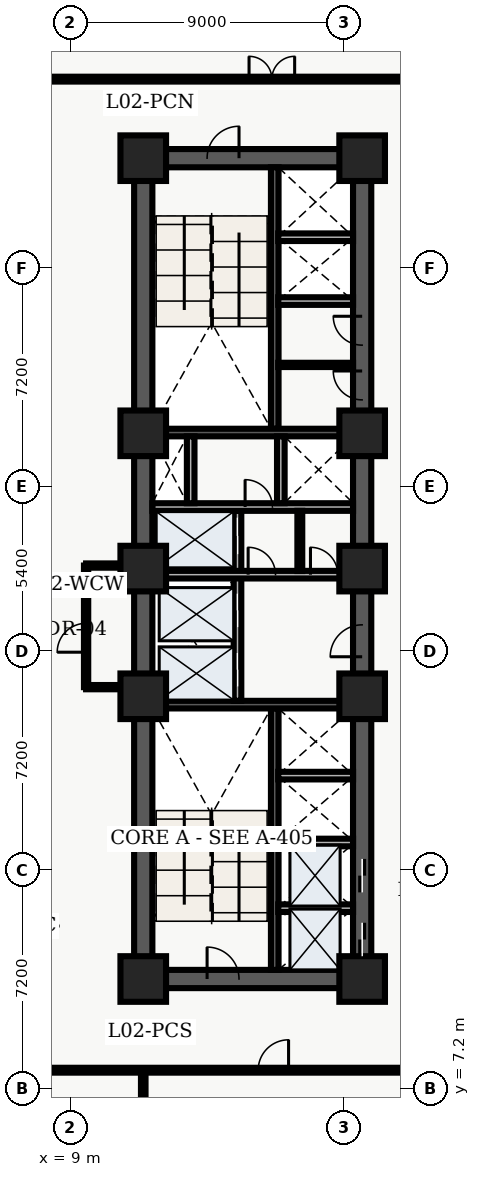
"""IFC4 building model, lengths in metres.
Left out: names, types, materials, properties, quantities, classifications, styles, units other than length and angle.
Written with IfcOpenShell. Run it as: python <this file> out.ifc"""

import sys

from ifc_helpers import new_model, entity, si_unit, converted_unit, direction, frame, origin_with_axes, origin_2d_with_axis, place, context, subcontext, project, spatial, polyline, rectangle, outline, extrude, element, fill, save


model = new_model("IFC4")
c1 = context("Model", 3, precision=1e-05, world=origin_with_axes(), true_north=direction((0.0, 1.0)))
c2 = subcontext(c1, "Body", "Model", "MODEL_VIEW")
j1 = project(units=[si_unit("LENGTHUNIT", "METRE"), converted_unit("PLANEANGLEUNIT", "DEGREE", entity("IfcPlaneAngleMeasure", 0.017), si_unit("PLANEANGLEUNIT", "RADIAN"), dimensions=[0, 0, 0, 0, 0, 0, 0])], contexts=[c1])
p1 = place(None, origin_with_axes())
s1 = spatial("IfcSite", under=j1, at=p1, CompositionType="ELEMENT")
p2 = place(p1, origin_with_axes())
s2 = spatial("IfcBuilding", under=s1, at=p2, CompositionType="ELEMENT")
p3 = place(p2, frame((0.0, 0.0, 10.8), z_axis=(0.0, 0.0, 1.0), x_axis=(1.0, 0.0, 0.0)))
s3 = spatial("IfcBuildingStorey", under=s2, at=p3, CompositionType="ELEMENT", Elevation=10.8)
p4 = place(p3, frame((11.4, 10.8, 0.0), z_axis=(0.0, 0.0, 1.0), x_axis=(0.0, 1.0, 0.0)))
e1 = element("IfcWall", 1, at=p4, inside=s3, PredefinedType="SHEAR", context=c2, shape_type="SweptSolid", body=[
    extrude(outline(polyline([(0.0, -0.3), (27.0, -0.3), (27.0, 0.3), (0.0, 0.3), (0.0, -0.3)])), origin_with_axes(), (0.0, 0.0, 1.0), 4.26),
])
p5 = place(p3, frame((11.4, 10.8, 0.0), z_axis=(0.0, 0.0, 1.0), x_axis=(1.0, 0.0, 0.0)))
e2 = element("IfcWall", 2, at=p5, inside=s3, PredefinedType="SHEAR", context=c2, shape_type="SweptSolid", body=[
    extrude(outline(polyline([(0.0, -0.3), (7.2, -0.3), (7.2, 0.3), (0.0, 0.3), (0.0, -0.3)])), origin_with_axes(), (0.0, 0.0, 1.0), 4.26),
])
p6 = place(p5, frame((2.625, 0.0, 0.0), z_axis=(0.0, 0.0, 1.0), x_axis=(1.0, 0.0, 0.0)))
e3 = element("IfcOpeningElement", 3, at=p6, cuts=e2, PredefinedType="OPENING", context=c2, shape_type="SweptSolid", body=[
    extrude(rectangle(XDim=1.05, YDim=0.62, at=origin_2d_with_axis()), origin_with_axes(), (0.0, 0.0, 1.0), 2.15),
])
p7 = place(p3, frame((11.4, 37.8, 0.0), z_axis=(0.0, 0.0, 1.0), x_axis=(1.0, 0.0, 0.0)))
e4 = element("IfcWall", 4, at=p7, inside=s3, PredefinedType="SHEAR", context=c2, shape_type="SweptSolid", body=[
    extrude(outline(polyline([(0.0, -0.3), (7.2, -0.3), (7.2, 0.3), (0.0, 0.3), (0.0, -0.3)])), origin_with_axes(), (0.0, 0.0, 1.0), 4.26),
])
p8 = place(p7, frame((2.625, 0.0, 0.0), z_axis=(0.0, 0.0, 1.0), x_axis=(1.0, 0.0, 0.0)))
e5 = element("IfcOpeningElement", 5, at=p8, cuts=e4, PredefinedType="OPENING", context=c2, shape_type="SweptSolid", body=[
    extrude(rectangle(XDim=1.05, YDim=0.62, at=origin_2d_with_axis()), origin_with_axes(), (0.0, 0.0, 1.0), 2.15),
])
p9 = place(p3, frame((18.6, 10.8, 0.0), z_axis=(0.0, 0.0, 1.0), x_axis=(0.0, 1.0, 0.0)))
e6 = element("IfcWall", 6, at=p9, inside=s3, PredefinedType="SHEAR", context=c2, shape_type="SweptSolid", body=[
    extrude(outline(polyline([(0.0, -0.3), (13.5, -0.3), (13.5, 0.3), (0.0, 0.3), (0.0, -0.3)])), origin_with_axes(), (0.0, 0.0, 1.0), 4.26),
])
p10 = place(p9, frame((1.3, 0.0, 0.0), z_axis=(0.0, 0.0, 1.0), x_axis=(1.0, 0.0, 0.0)))
e7 = element("IfcOpeningElement", 7, at=p10, cuts=e6, PredefinedType="OPENING", context=c2, shape_type="SweptSolid", body=[
    extrude(rectangle(XDim=1.1, YDim=0.62, at=origin_2d_with_axis()), origin_with_axes(), (0.0, 0.0, 1.0), 2.15),
])
p11 = place(p9, frame((3.4, 0.0, 0.0), z_axis=(0.0, 0.0, 1.0), x_axis=(1.0, 0.0, 0.0)))
e8 = element("IfcOpeningElement", 8, at=p11, cuts=e6, PredefinedType="OPENING", context=c2, shape_type="SweptSolid", body=[
    extrude(rectangle(XDim=1.1, YDim=0.62, at=origin_2d_with_axis()), origin_with_axes(), (0.0, 0.0, 1.0), 2.15),
])
p12 = place(p9, frame((11.125, 0.0, 0.0), z_axis=(0.0, 0.0, 1.0), x_axis=(1.0, 0.0, 0.0)))
e9 = element("IfcOpeningElement", 9, at=p12, cuts=e6, PredefinedType="OPENING", context=c2, shape_type="SweptSolid", body=[
    extrude(rectangle(XDim=1.05, YDim=0.62, at=origin_2d_with_axis()), origin_with_axes(), (0.0, 0.0, 1.0), 2.15),
])
p13 = place(p3, frame((18.6, 24.3, 0.0), z_axis=(0.0, 0.0, 1.0), x_axis=(0.0, 1.0, 0.0)))
e10 = element("IfcWall", 10, at=p13, inside=s3, PredefinedType="SHEAR", context=c2, shape_type="SweptSolid", body=[
    extrude(outline(polyline([(0.0, -0.3), (13.5, -0.3), (13.5, 0.3), (0.0, 0.3), (0.0, -0.3)])), origin_with_axes(), (0.0, 0.0, 1.0), 4.26),
])
p14 = place(p13, frame((6.025, 0.0, 0.0), z_axis=(0.0, 0.0, 1.0), x_axis=(1.0, 0.0, 0.0)))
e11 = element("IfcOpeningElement", 11, at=p14, cuts=e10, PredefinedType="OPENING", context=c2, shape_type="SweptSolid", body=[
    extrude(rectangle(XDim=0.95, YDim=0.62, at=origin_2d_with_axis()), origin_with_axes(), (0.0, 0.0, 1.0), 2.15),
])
p15 = place(p13, frame((7.825, 0.0, 0.0), z_axis=(0.0, 0.0, 1.0), x_axis=(1.0, 0.0, 0.0)))
e12 = element("IfcOpeningElement", 12, at=p15, cuts=e10, PredefinedType="OPENING", context=c2, shape_type="SweptSolid", body=[
    extrude(rectangle(XDim=0.95, YDim=0.62, at=origin_2d_with_axis()), origin_with_axes(), (0.0, 0.0, 1.0), 2.15),
])
p16 = place(p3, frame((15.725, 11.1, 0.0), z_axis=(0.0, 0.0, 1.0), x_axis=(0.0, 1.0, 0.0)))
e13 = element("IfcWall", 13, at=p16, inside=s3, PredefinedType="SHEAR", context=c2, shape_type="SweptSolid", body=[
    extrude(outline(polyline([(0.0, -0.125), (8.6, -0.125), (8.6, 0.125), (0.0, 0.125), (0.0, -0.125)])), origin_with_axes(), (0.0, 0.0, 1.0), 4.26),
])
p17 = place(p3, frame((11.7, 19.825, 0.0), z_axis=(0.0, 0.0, 1.0), x_axis=(1.0, 0.0, 0.0)))
e14 = element("IfcWall", 14, at=p17, inside=s3, PredefinedType="SHEAR", context=c2, shape_type="SweptSolid", body=[
    extrude(outline(polyline([(0.0, -0.125), (6.6, -0.125), (6.6, 0.125), (0.0, 0.125), (0.0, -0.125)])), origin_with_axes(), (0.0, 0.0, 1.0), 4.26),
])
p18 = place(p3, frame((15.725, 28.9, 0.0), z_axis=(0.0, 0.0, 1.0), x_axis=(0.0, 1.0, 0.0)))
e15 = element("IfcWall", 15, at=p18, inside=s3, PredefinedType="SHEAR", context=c2, shape_type="SweptSolid", body=[
    extrude(outline(polyline([(0.0, -0.125), (8.6, -0.125), (8.6, 0.125), (0.0, 0.125), (0.0, -0.125)])), origin_with_axes(), (0.0, 0.0, 1.0), 4.26),
])
p19 = place(p3, frame((11.7, 28.775, 0.0), z_axis=(0.0, 0.0, 1.0), x_axis=(1.0, 0.0, 0.0)))
e16 = element("IfcWall", 16, at=p19, inside=s3, PredefinedType="SHEAR", context=c2, shape_type="SweptSolid", body=[
    extrude(outline(polyline([(0.0, -0.125), (6.6, -0.125), (6.6, 0.125), (0.0, 0.125), (0.0, -0.125)])), origin_with_axes(), (0.0, 0.0, 1.0), 4.26),
])
p20 = place(p3, frame((14.5, 19.95, 0.0), z_axis=(0.0, 0.0, 1.0), x_axis=(0.0, 1.0, 0.0)))
e17 = element("IfcWall", 17, at=p20, inside=s3, PredefinedType="SOLIDWALL", context=c2, shape_type="SweptSolid", body=[
    extrude(outline(polyline([(0.0, -0.125), (6.25, -0.125), (6.25, 0.125), (0.0, 0.125), (0.0, -0.125)])), origin_with_axes(), (0.0, 0.0, 1.0), 3.3),
])
p21 = place(p20, frame((1.025, 0.0, 0.0), z_axis=(0.0, 0.0, 1.0), x_axis=(1.0, 0.0, 0.0)))
e18 = element("IfcOpeningElement", 18, at=p21, cuts=e17, PredefinedType="OPENING", context=c2, shape_type="SweptSolid", body=[
    extrude(rectangle(XDim=1.1, YDim=0.27, at=origin_2d_with_axis()), origin_with_axes(), (0.0, 0.0, 1.0), 2.15),
])
p22 = place(p20, frame((2.975, 0.0, 0.0), z_axis=(0.0, 0.0, 1.0), x_axis=(1.0, 0.0, 0.0)))
e19 = element("IfcOpeningElement", 19, at=p22, cuts=e17, PredefinedType="OPENING", context=c2, shape_type="SweptSolid", body=[
    extrude(rectangle(XDim=1.1, YDim=0.27, at=origin_2d_with_axis()), origin_with_axes(), (0.0, 0.0, 1.0), 2.15),
])
p23 = place(p20, frame((5.425, 0.0, 0.0), z_axis=(0.0, 0.0, 1.0), x_axis=(1.0, 0.0, 0.0)))
e20 = element("IfcOpeningElement", 20, at=p23, cuts=e17, PredefinedType="OPENING", context=c2, shape_type="SweptSolid", body=[
    extrude(rectangle(XDim=1.2, YDim=0.27, at=origin_2d_with_axis()), origin_with_axes(), (0.0, 0.0, 1.0), 2.15),
])
p24 = place(p3, frame((11.7, 24.1, 0.0), z_axis=(0.0, 0.0, 1.0), x_axis=(1.0, 0.0, 0.0)))
e21 = element("IfcWall", 21, at=p24, inside=s3, PredefinedType="SOLIDWALL", context=c2, shape_type="SweptSolid", body=[
    extrude(outline(polyline([(0.0, -0.125), (6.6, -0.125), (6.6, 0.125), (0.0, 0.125), (0.0, -0.125)])), origin_with_axes(), (0.0, 0.0, 1.0), 3.3),
])
p25 = place(p24, frame((3.6, 0.0, 0.0), z_axis=(0.0, 0.0, 1.0), x_axis=(1.0, 0.0, 0.0)))
e22 = element("IfcOpeningElement", 22, at=p25, cuts=e21, PredefinedType="OPENING", context=c2, shape_type="SweptSolid", body=[
    extrude(rectangle(XDim=0.9, YDim=0.27, at=origin_2d_with_axis()), origin_with_axes(), (0.0, 0.0, 1.0), 2.15),
])
p26 = place(p24, frame((5.65, 0.0, 0.0), z_axis=(0.0, 0.0, 1.0), x_axis=(1.0, 0.0, 0.0)))
e23 = element("IfcOpeningElement", 23, at=p26, cuts=e21, PredefinedType="OPENING", context=c2, shape_type="SweptSolid", body=[
    extrude(rectangle(XDim=0.9, YDim=0.27, at=origin_2d_with_axis()), origin_with_axes(), (0.0, 0.0, 1.0), 2.15),
])
p27 = place(p3, frame((11.7, 26.325, 0.0), z_axis=(0.0, 0.0, 1.0), x_axis=(1.0, 0.0, 0.0)))
e24 = element("IfcWall", 24, at=p27, inside=s3, PredefinedType="SOLIDWALL", context=c2, shape_type="SweptSolid", body=[
    extrude(outline(polyline([(0.0, -0.125), (6.6, -0.125), (6.6, 0.125), (0.0, 0.125), (0.0, -0.125)])), origin_with_axes(), (0.0, 0.0, 1.0), 3.3),
])
p28 = place(p27, frame((3.5, 0.0, 0.0), z_axis=(0.0, 0.0, 1.0), x_axis=(1.0, 0.0, 0.0)))
e25 = element("IfcOpeningElement", 25, at=p28, cuts=e24, PredefinedType="OPENING", context=c2, shape_type="SweptSolid", body=[
    extrude(rectangle(XDim=0.9, YDim=0.27, at=origin_2d_with_axis()), origin_with_axes(), (0.0, 0.0, 1.0), 2.15),
])
for number, where, z_axis, x_axis in (
    (26, (12.96, 26.45, 0.0), (0.0, 0.0, 1.0), (0.0, 1.0, 0.0)),
    (27, (15.925, 26.45, 0.0), (0.0, 0.0, 1.0), (0.0, 1.0, 0.0)),
):
    element("IfcWall", number, at=place(p3, frame(where, z_axis=z_axis, x_axis=x_axis)), inside=s3, PredefinedType="SOLIDWALL", context=c2, shape_type="SweptSolid", body=[
        extrude(outline(polyline([(0.0, -0.125), (2.2, -0.125), (2.2, 0.125), (0.0, 0.125), (0.0, -0.125)])), origin_with_axes(), (0.0, 0.0, 1.0), 3.3),
    ])
for number, where, z_axis, x_axis in (
    (28, (11.4, 10.8, 0.0), (0.0, 0.0, 1.0), (1.0, 0.0, 0.0)),
    (29, (11.4, 20.1, 0.0), (0.0, 0.0, 1.0), (1.0, 0.0, 0.0)),
    (30, (11.4, 24.3, 0.0), (0.0, 0.0, 1.0), (1.0, 0.0, 0.0)),
    (31, (11.4, 28.75, 0.0), (0.0, 0.0, 1.0), (1.0, 0.0, 0.0)),
    (32, (11.4, 37.8, 0.0), (0.0, 0.0, 1.0), (1.0, 0.0, 0.0)),
    (33, (18.6, 10.8, 0.0), (0.0, 0.0, 1.0), (1.0, 0.0, 0.0)),
    (34, (18.6, 20.1, 0.0), (0.0, 0.0, 1.0), (1.0, 0.0, 0.0)),
    (35, (18.6, 24.3, 0.0), (0.0, 0.0, 1.0), (1.0, 0.0, 0.0)),
    (36, (18.6, 28.75, 0.0), (0.0, 0.0, 1.0), (1.0, 0.0, 0.0)),
    (37, (18.6, 37.8, 0.0), (0.0, 0.0, 1.0), (1.0, 0.0, 0.0)),
):
    element("IfcColumn", number, at=place(p3, frame(where, z_axis=z_axis, x_axis=x_axis)), inside=s3, PredefinedType="COLUMN", context=c2, shape_type="SweptSolid", body=[
        extrude(rectangle(XDim=1.5, YDim=1.5, at=origin_2d_with_axis()), origin_with_axes(), (0.0, 0.0, 1.0), 4.5),
    ])
p29 = place(p3, frame((16.55, 24.22, 0.0), z_axis=(0.0, 0.0, 1.0), x_axis=(0.0, 1.0, 0.0)))
e38 = element("IfcWall", 38, at=p29, inside=s3, PredefinedType="PARTITIONING", context=c2, shape_type="SweptSolid", body=[
    extrude(outline(polyline([(0.0, -0.08), (1.98, -0.08), (1.98, 0.08), (0.0, 0.08), (0.0, -0.08)])), origin_with_axes(), (0.0, 0.0, 1.0), 3.2),
])
for number, where, z_axis, x_axis in (
    (39, (15.84, 13.13, 0.0), (0.0, 0.0, 1.0), (1.0, 0.0, 0.0)),
    (40, (15.84, 15.29, 0.0), (0.0, 0.0, 1.0), (1.0, 0.0, 0.0)),
    (41, (15.84, 17.49, 0.0), (0.0, 0.0, 1.0), (1.0, 0.0, 0.0)),
    (42, (15.84, 33.1, 0.0), (0.0, 0.0, 1.0), (1.0, 0.0, 0.0)),
    (43, (15.84, 35.2, 0.0), (0.0, 0.0, 1.0), (1.0, 0.0, 0.0)),
):
    element("IfcWall", number, at=place(p3, frame(where, z_axis=z_axis, x_axis=x_axis)), inside=s3, PredefinedType="SOLIDWALL", context=c2, shape_type="SweptSolid", body=[
        extrude(outline(polyline([(0.0, -0.125), (2.46, -0.125), (2.46, 0.125), (0.0, 0.125), (0.0, -0.125)])), origin_with_axes(), (0.0, 0.0, 1.0), 3.2),
    ])
p30 = place(p3, frame((15.84, 31.0, 0.0), z_axis=(0.0, 0.0, 1.0), x_axis=(1.0, 0.0, 0.0)))
e44 = element("IfcWall", 44, at=p30, inside=s3, PredefinedType="PARTITIONING", context=c2, shape_type="SweptSolid", body=[
    extrude(outline(polyline([(0.0, -0.07), (2.46, -0.07), (2.46, 0.07), (0.0, 0.07), (0.0, -0.07)])), origin_with_axes(), (0.0, 0.0, 1.0), 3.2),
])
p31 = place(p3, frame((9.52, 20.4, 0.0), z_axis=(0.0, 0.0, 1.0), x_axis=(0.0, 1.0, 0.0)))
e45 = element("IfcWall", 45, at=p31, inside=s3, PredefinedType="PARTITIONING", context=c2, shape_type="SweptSolid", body=[
    extrude(outline(polyline([(0.0, -0.07), (4.0, -0.07), (4.0, 0.07), (0.0, 0.07), (0.0, -0.07)])), origin_with_axes(), (0.0, 0.0, 1.0), 3.2),
])
p32 = place(p31, frame((1.625, 0.0, 0.0), z_axis=(0.0, 0.0, 1.0), x_axis=(1.0, 0.0, 0.0)))
e46 = element("IfcOpeningElement", 46, at=p32, cuts=e45, PredefinedType="OPENING", context=c2, shape_type="SweptSolid", body=[
    extrude(rectangle(XDim=0.95, YDim=0.16, at=origin_2d_with_axis()), origin_with_axes(), (0.0, 0.0, 1.0), 2.15),
])
for number, where, z_axis, x_axis in (
    (47, (9.52, 20.4, 0.0), (0.0, 0.0, 1.0), (1.0, 0.0, 0.0)),
    (48, (9.52, 24.4, 0.0), (0.0, 0.0, 1.0), (1.0, 0.0, 0.0)),
):
    element("IfcWall", number, at=place(p3, frame(where, z_axis=z_axis, x_axis=x_axis)), inside=s3, PredefinedType="PARTITIONING", context=c2, shape_type="SweptSolid", body=[
        extrude(outline(polyline([(0.0, -0.07), (1.58, -0.07), (1.58, 0.07), (0.0, 0.07), (0.0, -0.07)])), origin_with_axes(), (0.0, 0.0, 1.0), 3.2),
    ])
p33 = place(p3, frame((0.38, 7.8, 0.0), z_axis=(0.0, 0.0, 1.0), x_axis=(1.0, 0.0, 0.0)))
e49 = element("IfcWall", 49, at=p33, inside=s3, PredefinedType="PARTITIONING", context=c2, shape_type="SweptSolid", body=[
    extrude(outline(polyline([(0.0, -0.08), (20.92, -0.08), (20.92, 0.08), (0.0, 0.08), (0.0, -0.08)])), origin_with_axes(), (0.0, 0.0, 1.0), 3.2),
])
p34 = place(p33, frame((3.7, 0.0, 0.0), z_axis=(0.0, 0.0, 1.0), x_axis=(1.0, 0.0, 0.0)))
e50 = element("IfcOpeningElement", 50, at=p34, cuts=e49, PredefinedType="OPENING", context=c2, shape_type="SweptSolid", body=[
    extrude(rectangle(XDim=1.0, YDim=0.18, at=origin_2d_with_axis()), origin_with_axes(), (0.0, 0.0, 1.0), 2.15),
])
p35 = place(p33, frame((15.3, 0.0, 0.0), z_axis=(0.0, 0.0, 1.0), x_axis=(1.0, 0.0, 0.0)))
e51 = element("IfcOpeningElement", 51, at=p35, cuts=e49, PredefinedType="OPENING", context=c2, shape_type="SweptSolid", body=[
    extrude(rectangle(XDim=1.0, YDim=0.18, at=origin_2d_with_axis()), origin_with_axes(), (0.0, 0.0, 1.0), 2.15),
])
p36 = place(p3, frame((11.4, 0.38, 0.0), z_axis=(0.0, 0.0, 1.0), x_axis=(0.0, 1.0, 0.0)))
e52 = element("IfcWall", 52, at=p36, inside=s3, PredefinedType="PARTITIONING", context=c2, shape_type="SweptSolid", body=[
    extrude(outline(polyline([(0.0, -0.075), (7.42, -0.075), (7.42, 0.075), (0.0, 0.075), (0.0, -0.075)])), origin_with_axes(), (0.0, 0.0, 1.0), 3.2),
])
p37 = place(p3, frame((0.38, 40.4, 0.0), z_axis=(0.0, 0.0, 1.0), x_axis=(1.0, 0.0, 0.0)))
e53 = element("IfcWall", 53, at=p37, inside=s3, PredefinedType="PARTITIONING", context=c2, shape_type="SweptSolid", body=[
    extrude(outline(polyline([(0.0, -0.08), (20.92, -0.08), (20.92, 0.08), (0.0, 0.08), (0.0, -0.08)])), origin_with_axes(), (0.0, 0.0, 1.0), 3.2),
])
p38 = place(p37, frame((15.25, 0.0, 0.0), z_axis=(0.0, 0.0, 1.0), x_axis=(1.0, 0.0, 0.0)))
e54 = element("IfcOpeningElement", 54, at=p38, cuts=e53, PredefinedType="OPENING", context=c2, shape_type="SweptSolid", body=[
    extrude(rectangle(XDim=1.5, YDim=0.18, at=origin_2d_with_axis()), origin_with_axes(), (0.0, 0.0, 1.0), 2.2),
])
p39 = place(p9, frame((1.3, 0.0, 0.0), z_axis=(0.0, 0.0, 1.0), x_axis=(1.0, 0.0, 0.0)))
e55 = element("IfcDoor", 55, at=p39, inside=s3, OperationType="SLIDING_TO_LEFT", PredefinedType="DOOR", context=c2, shape_type="SweptSolid", body=[
    extrude(rectangle(XDim=1.1, YDim=0.09, at=origin_2d_with_axis()), origin_with_axes(), (0.0, 0.0, 1.0), 2.15),
])
fill(e7, e55)
p40 = place(p9, frame((3.4, 0.0, 0.0), z_axis=(0.0, 0.0, 1.0), x_axis=(1.0, 0.0, 0.0)))
e56 = element("IfcDoor", 56, at=p40, inside=s3, OperationType="SLIDING_TO_RIGHT", PredefinedType="DOOR", context=c2, shape_type="SweptSolid", body=[
    extrude(rectangle(XDim=1.1, YDim=0.09, at=origin_2d_with_axis()), origin_with_axes(), (0.0, 0.0, 1.0), 2.15),
])
fill(e8, e56)
p41 = place(p20, frame((1.025, 0.0, 0.0), z_axis=(0.0, 0.0, 1.0), x_axis=(1.0, 0.0, 0.0)))
e57 = element("IfcDoor", 57, at=p41, inside=s3, OperationType="SLIDING_TO_LEFT", PredefinedType="DOOR", context=c2, shape_type="SweptSolid", body=[
    extrude(rectangle(XDim=1.1, YDim=0.09, at=origin_2d_with_axis()), origin_with_axes(), (0.0, 0.0, 1.0), 2.15),
])
fill(e18, e57)
p42 = place(p20, frame((2.975, 0.0, 0.0), z_axis=(0.0, 0.0, 1.0), x_axis=(1.0, 0.0, 0.0)))
e58 = element("IfcDoor", 58, at=p42, inside=s3, OperationType="SLIDING_TO_RIGHT", PredefinedType="DOOR", context=c2, shape_type="SweptSolid", body=[
    extrude(rectangle(XDim=1.1, YDim=0.09, at=origin_2d_with_axis()), origin_with_axes(), (0.0, 0.0, 1.0), 2.15),
])
fill(e19, e58)
p43 = place(p20, frame((5.425, 0.0, 0.0), z_axis=(0.0, 0.0, 1.0), x_axis=(1.0, 0.0, 0.0)))
e59 = element("IfcDoor", 59, at=p43, inside=s3, OperationType="DOUBLE_DOOR_SLIDING", PredefinedType="DOOR", context=c2, shape_type="SweptSolid", body=[
    extrude(rectangle(XDim=1.2, YDim=0.09, at=origin_2d_with_axis()), origin_with_axes(), (0.0, 0.0, 1.0), 2.15),
])
fill(e20, e59)
p44 = place(p5, frame((2.625, 0.0, 0.0), z_axis=(0.0, 0.0, 1.0), x_axis=(1.0, 0.0, 0.0)))
e60 = element("IfcDoor", 60, at=p44, inside=s3, OperationType="SINGLE_SWING_LEFT", PredefinedType="DOOR", context=c2, shape_type="SweptSolid", body=[
    extrude(rectangle(XDim=1.05, YDim=0.09, at=origin_2d_with_axis()), origin_with_axes(), (0.0, 0.0, 1.0), 2.15),
])
fill(e3, e60)
p45 = place(p7, frame((2.625, 0.0, 0.0), z_axis=(0.0, 0.0, 1.0), x_axis=(1.0, 0.0, 0.0)))
e61 = element("IfcDoor", 61, at=p45, inside=s3, OperationType="SINGLE_SWING_RIGHT", PredefinedType="DOOR", context=c2, shape_type="SweptSolid", body=[
    extrude(rectangle(XDim=1.05, YDim=0.09, at=origin_2d_with_axis()), origin_with_axes(), (0.0, 0.0, 1.0), 2.15),
])
fill(e5, e61)
p46 = place(p9, frame((11.125, 0.0, 0.0), z_axis=(0.0, 0.0, 1.0), x_axis=(1.0, 0.0, 0.0)))
e62 = element("IfcDoor", 62, at=p46, inside=s3, OperationType="SINGLE_SWING_LEFT", PredefinedType="DOOR", context=c2, shape_type="SweptSolid", body=[
    extrude(rectangle(XDim=1.05, YDim=0.09, at=origin_2d_with_axis()), origin_with_axes(), (0.0, 0.0, 1.0), 2.15),
])
fill(e9, e62)
p47 = place(p24, frame((3.6, 0.0, 0.0), z_axis=(0.0, 0.0, 1.0), x_axis=(1.0, 0.0, 0.0)))
e63 = element("IfcDoor", 63, at=p47, inside=s3, OperationType="SINGLE_SWING_LEFT", PredefinedType="DOOR", context=c2, shape_type="SweptSolid", body=[
    extrude(rectangle(XDim=0.9, YDim=0.09, at=origin_2d_with_axis()), origin_with_axes(), (0.0, 0.0, 1.0), 2.15),
])
fill(e22, e63)
p48 = place(p24, frame((5.65, 0.0, 0.0), z_axis=(0.0, 0.0, 1.0), x_axis=(1.0, 0.0, 0.0)))
e64 = element("IfcDoor", 64, at=p48, inside=s3, OperationType="SINGLE_SWING_LEFT", PredefinedType="DOOR", context=c2, shape_type="SweptSolid", body=[
    extrude(rectangle(XDim=0.9, YDim=0.09, at=origin_2d_with_axis()), origin_with_axes(), (0.0, 0.0, 1.0), 2.15),
])
fill(e23, e64)
p49 = place(p27, frame((3.5, 0.0, 0.0), z_axis=(0.0, 0.0, 1.0), x_axis=(1.0, 0.0, 0.0)))
e65 = element("IfcDoor", 65, at=p49, inside=s3, OperationType="SINGLE_SWING_LEFT", PredefinedType="DOOR", context=c2, shape_type="SweptSolid", body=[
    extrude(rectangle(XDim=0.9, YDim=0.09, at=origin_2d_with_axis()), origin_with_axes(), (0.0, 0.0, 1.0), 2.15),
])
fill(e25, e65)
p50 = place(p13, frame((6.025, 0.0, 0.0), z_axis=(0.0, 0.0, 1.0), x_axis=(1.0, 0.0, 0.0)))
e66 = element("IfcDoor", 66, at=p50, inside=s3, OperationType="SINGLE_SWING_RIGHT", PredefinedType="DOOR", context=c2, shape_type="SweptSolid", body=[
    extrude(rectangle(XDim=0.95, YDim=0.09, at=origin_2d_with_axis()), origin_with_axes(), (0.0, 0.0, 1.0), 2.15),
])
fill(e11, e66)
p51 = place(p13, frame((7.825, 0.0, 0.0), z_axis=(0.0, 0.0, 1.0), x_axis=(1.0, 0.0, 0.0)))
e67 = element("IfcDoor", 67, at=p51, inside=s3, OperationType="SINGLE_SWING_RIGHT", PredefinedType="DOOR", context=c2, shape_type="SweptSolid", body=[
    extrude(rectangle(XDim=0.95, YDim=0.09, at=origin_2d_with_axis()), origin_with_axes(), (0.0, 0.0, 1.0), 2.15),
])
fill(e12, e67)
p52 = place(p31, frame((1.625, 0.0, 0.0), z_axis=(0.0, 0.0, 1.0), x_axis=(1.0, 0.0, 0.0)))
e68 = element("IfcDoor", 68, at=p52, inside=s3, OperationType="SINGLE_SWING_LEFT", PredefinedType="DOOR", context=c2, shape_type="SweptSolid", body=[
    extrude(rectangle(XDim=0.95, YDim=0.084, at=origin_2d_with_axis()), origin_with_axes(), (0.0, 0.0, 1.0), 2.15),
])
fill(e46, e68)
p53 = place(p33, frame((15.3, 0.0, 0.0), z_axis=(0.0, 0.0, 1.0), x_axis=(1.0, 0.0, 0.0)))
e69 = element("IfcDoor", 69, at=p53, inside=s3, OperationType="SINGLE_SWING_RIGHT", PredefinedType="DOOR", context=c2, shape_type="SweptSolid", body=[
    extrude(rectangle(XDim=1.0, YDim=0.09, at=origin_2d_with_axis()), origin_with_axes(), (0.0, 0.0, 1.0), 2.15),
])
fill(e51, e69)
p54 = place(p37, frame((15.25, 0.0, 0.0), z_axis=(0.0, 0.0, 1.0), x_axis=(1.0, 0.0, 0.0)))
e70 = element("IfcDoor", 70, at=p54, inside=s3, OperationType="DOUBLE_DOOR_SINGLE_SWING", PredefinedType="DOOR", context=c2, shape_type="SweptSolid", body=[
    extrude(rectangle(XDim=1.5, YDim=0.09, at=origin_2d_with_axis()), origin_with_axes(), (0.0, 0.0, 1.0), 2.2),
])
fill(e54, e70)
save(model, sys.argv[1])
